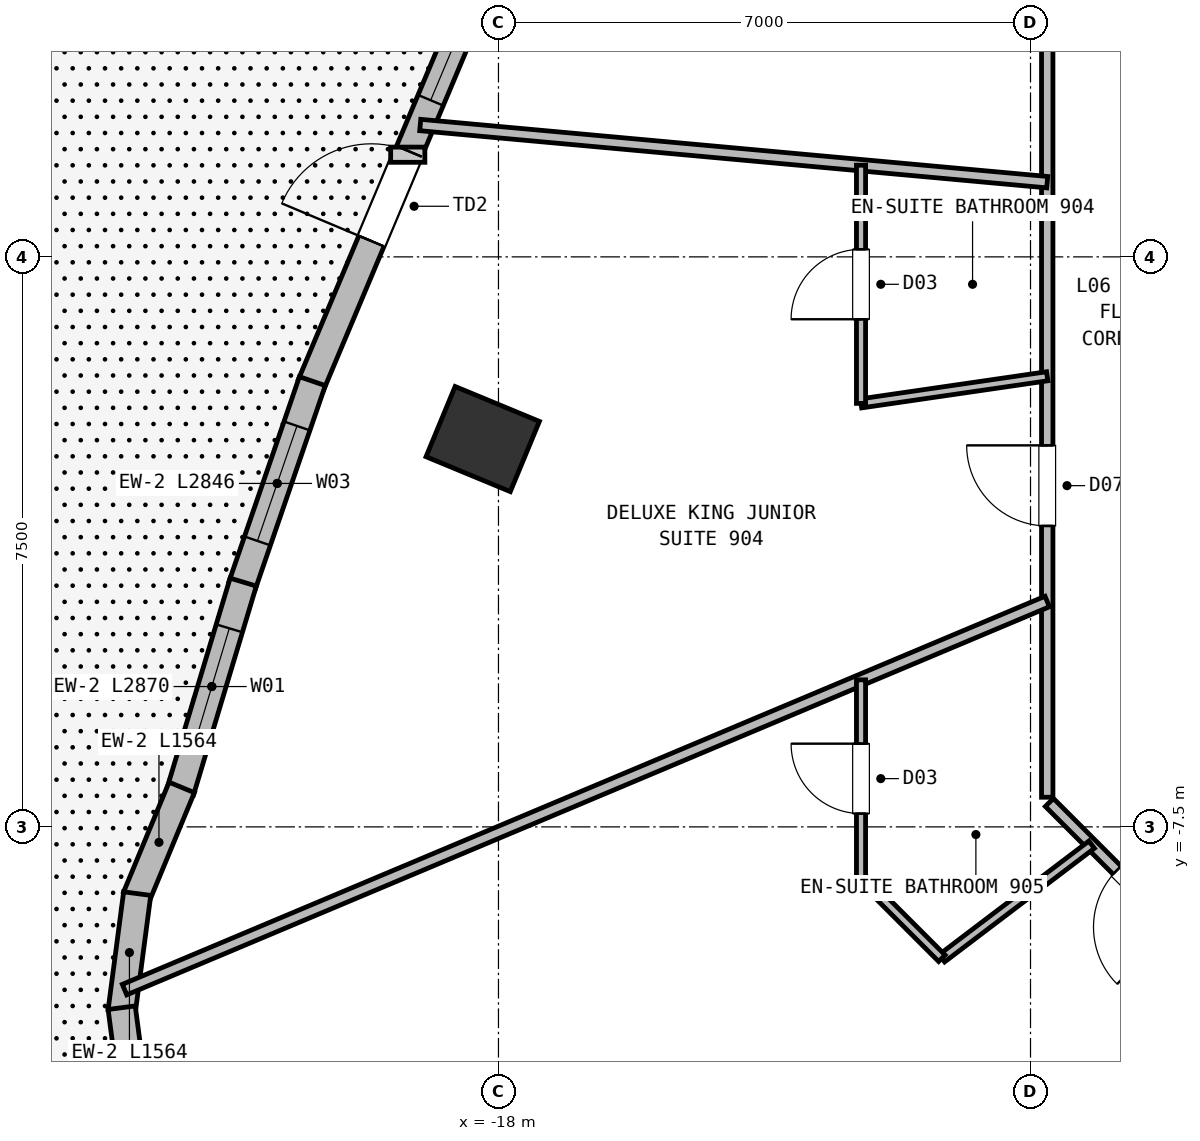
"""IFC4 building model, lengths in metres.
Left out: names, types, materials, properties, quantities, classifications, styles, units other than length and angle.
Written with IfcOpenShell. Run it as: python <this file> out.ifc"""

import sys

from ifc_helpers import new_model, si_unit, direction, frame, frame_2d, origin, origin_2d, place, context, subcontext, project, spatial, rectangle, extrude, element, fill, save


model = new_model("IFC4")
c1 = context("Model", 3, precision=1e-05, world=origin(), true_north=direction((0.0, 1.0)))
c2 = subcontext(c1, "Body", "Model", "MODEL_VIEW")
j1 = project(units=[si_unit("LENGTHUNIT", "METRE"), si_unit("PLANEANGLEUNIT", "RADIAN")], contexts=[c1])
p1 = place(None, origin())
s1 = spatial("IfcSite", under=j1, at=p1, CompositionType="ELEMENT")
p2 = place(p1, origin())
s2 = spatial("IfcBuilding", under=s1, at=p2, CompositionType="ELEMENT")
p3 = place(p2, frame((0.0, 0.0, 30.5)))
s3 = spatial("IfcBuildingStorey", under=s2, at=p3, CompositionType="ELEMENT", Elevation=30.5)
p4 = place(p3, frame((-18.207, -2.397, 0.0), z_axis=(0.0, 0.0, 1.0), x_axis=(0.382683432365, 0.923879532511, 0.0)))
e1 = element("IfcColumn", 1, at=p4, inside=s3, PredefinedType="COLUMN", context=c2, shape_type="SweptSolid", body=[
    extrude(rectangle(XDim=1.0, YDim=1.2, at=origin_2d()), origin(), (0.0, 0.0, 1.0), 3.75),
])
p5 = place(p3, frame((-20.466, -1.682, 0.0), z_axis=(0.0, 0.0, 1.0), x_axis=(0.387744465456, 0.921766906277, 0.0)))
e2 = element("IfcWall", 2, at=p5, inside=s3, PredefinedType="SOLIDWALL", context=c2, shape_type="SweptSolid", body=[
    extrude(rectangle(XDim=6.566, YDim=0.36, at=frame_2d((3.283, 0.0))), origin(), (0.0, 0.0, 1.0), 3.5),
])
p6 = place(p5, frame((2.05, 0.0, 0.0)))
e3 = element("IfcOpeningElement", 3, at=p6, cuts=e2, PredefinedType="OPENING", context=c2, shape_type="SweptSolid", body=[
    extrude(rectangle(XDim=1.28, YDim=2.2, at=frame_2d((0.64, 1.1))), frame((0.0, 0.19, 0.0), z_axis=(0.0, -1.0, 0.0), x_axis=(1.0, 0.0, 0.0)), (0.0, 0.0, 1.0), 0.38),
])
p7 = place(p5, frame((4.06, 0.0, 0.72)))
e4 = element("IfcOpeningElement", 4, at=p7, cuts=e2, PredefinedType="OPENING", context=c2, shape_type="SweptSolid", body=[
    extrude(rectangle(XDim=1.6, YDim=1.88, at=frame_2d((0.8, 0.94))), frame((0.0, 0.19, 0.0), z_axis=(0.0, -1.0, 0.0), x_axis=(1.0, 0.0, 0.0)), (0.0, 0.0, 1.0), 0.38),
])
p8 = place(p3, frame((-21.374, -4.327, 0.0), z_axis=(0.0, 0.0, 1.0), x_axis=(0.325091754677, 0.945682478975, 0.0)))
e5 = element("IfcWall", 5, at=p8, inside=s3, PredefinedType="SOLIDWALL", context=c2, shape_type="SweptSolid", body=[
    extrude(rectangle(XDim=2.846, YDim=0.36, at=frame_2d((1.423, 0.0))), origin(), (0.0, 0.0, 1.0), 3.5),
])
p9 = place(p8, frame((0.623, 0.0, 0.72)))
e6 = element("IfcOpeningElement", 6, at=p9, cuts=e5, PredefinedType="OPENING", context=c2, shape_type="SweptSolid", body=[
    extrude(rectangle(XDim=1.6, YDim=1.88, at=frame_2d((0.8, 0.94))), frame((0.0, 0.19, 0.0), z_axis=(0.0, -1.0, 0.0), x_axis=(1.0, 0.0, 0.0)), (0.0, 0.0, 1.0), 0.38),
])
p10 = place(p3, frame((-22.184, -7.028, 0.0), z_axis=(0.0, 0.0, 1.0), x_axis=(0.287784902043, 0.957695071594, 0.0)))
e7 = element("IfcWall", 7, at=p10, inside=s3, PredefinedType="SOLIDWALL", context=c2, shape_type="SweptSolid", body=[
    extrude(rectangle(XDim=2.87, YDim=0.36, at=frame_2d((1.435, 0.0))), origin(), (0.0, 0.0, 1.0), 3.5),
])
p11 = place(p10, frame((0.635, 0.0, 0.72)))
e8 = element("IfcOpeningElement", 8, at=p11, cuts=e7, PredefinedType="OPENING", context=c2, shape_type="SweptSolid", body=[
    extrude(rectangle(XDim=1.6, YDim=1.88, at=frame_2d((0.8, 0.94))), frame((0.0, 0.19, 0.0), z_axis=(0.0, -1.0, 0.0), x_axis=(1.0, 0.0, 0.0)), (0.0, 0.0, 1.0), 0.38),
])
for number, where, z_axis, x_axis in (
    (9, (-22.766, -8.426, 0.0), (0.0, 0.0, 1.0), (0.383, 0.924, 0.0)),
    (10, (-22.958, -9.929, 0.0), (0.0, 0.0, 1.0), (0.131, 0.991, 0.0)),
    (11, (-22.753, -11.43, 0.0), (0.0, 0.0, 1.0), (-0.131, 0.991, 0.0)),
):
    element("IfcWall", number, at=place(p3, frame(where, z_axis=z_axis, x_axis=x_axis)), inside=s3, PredefinedType="SOLIDWALL", context=c2, shape_type="SweptSolid", body=[
        extrude(rectangle(XDim=1.564, YDim=0.36, at=frame_2d((0.782, 0.0))), origin(), (0.0, 0.0, 1.0), 3.5),
    ])
p12 = place(p3, frame((-10.78, -7.11, 0.0), z_axis=(0.0, 0.0, 1.0), x_axis=(0.0, 1.0, 0.0)))
e12 = element("IfcWall", 12, at=p12, inside=s3, PredefinedType="PARTITIONING", context=c2, shape_type="SweptSolid", body=[
    extrude(rectangle(XDim=14.22, YDim=0.15, at=frame_2d((7.11, 0.0))), origin(), (0.0, 0.0, 1.0), 3.12),
])
p13 = place(p12, frame((10.606, 0.0, 0.0)))
e13 = element("IfcOpeningElement", 13, at=p13, cuts=e12, PredefinedType="OPENING", context=c2, shape_type="SweptSolid", body=[
    extrude(rectangle(XDim=1.0, YDim=2.15, at=frame_2d((0.5, 1.075))), frame((0.0, 0.085, 0.0), z_axis=(0.0, -1.0, 0.0), x_axis=(1.0, 0.0, 0.0)), (0.0, 0.0, 1.0), 0.17),
])
p14 = place(p12, frame((3.57, 0.0, 0.0)))
e14 = element("IfcOpeningElement", 14, at=p14, cuts=e12, PredefinedType="OPENING", context=c2, shape_type="SweptSolid", body=[
    extrude(rectangle(XDim=1.06, YDim=2.15, at=frame_2d((0.53, 1.075))), frame((0.0, 0.085, 0.0), z_axis=(0.0, -1.0, 0.0), x_axis=(1.0, 0.0, 0.0)), (0.0, 0.0, 1.0), 0.17),
])
p15 = place(p3, frame((-8.578, -9.352, 0.0), z_axis=(0.0, 0.0, 1.0), x_axis=(-0.707067066127, 0.707146494016, 0.0)))
e15 = element("IfcWall", 15, at=p15, inside=s3, PredefinedType="PARTITIONING", context=c2, shape_type="SweptSolid", body=[
    extrude(rectangle(XDim=3.074, YDim=0.15, at=frame_2d((1.537, 0.0))), origin(), (0.0, 0.0, 1.0), 3.5),
])
p16 = place(p15, frame((0.754, 0.0, 0.0)))
e16 = element("IfcOpeningElement", 16, at=p16, cuts=e15, PredefinedType="OPENING", context=c2, shape_type="SweptSolid", body=[
    extrude(rectangle(XDim=1.06, YDim=2.15, at=frame_2d((0.53, 1.075))), frame((0.0, 0.085, 0.0), z_axis=(0.0, -1.0, 0.0), x_axis=(1.0, 0.0, 0.0)), (0.0, 0.0, 1.0), 0.17),
])
p17 = place(p3, frame((-10.78, 0.983, 0.0), z_axis=(0.0, 0.0, 1.0), x_axis=(-0.995868528088, 0.090806799107, 0.0)))
e17 = element("IfcWall", 17, at=p17, inside=s3, PredefinedType="PARTITIONING", context=c2, shape_type="SweptSolid", body=[
    extrude(rectangle(XDim=8.283, YDim=0.15, at=frame_2d((4.142, 0.0))), origin(), (0.0, 0.0, 1.0), 3.5),
])
p18 = place(p3, frame((-10.78, -1.571, 0.0), z_axis=(0.0, 0.0, 1.0), x_axis=(-0.989553213028, -0.144168091425, 0.0)))
e18 = element("IfcWall", 18, at=p18, inside=s3, PredefinedType="PARTITIONING", context=c2, shape_type="SweptSolid", body=[
    extrude(rectangle(XDim=2.476, YDim=0.12, at=frame_2d((1.238, 0.0))), origin(), (0.0, 0.0, 1.0), 3.5),
])
p19 = place(p3, frame((-13.23, -1.928, 0.0), z_axis=(0.0, 0.0, 1.0), x_axis=(0.0, 1.0, 0.0)))
e19 = element("IfcWall", 19, at=p19, inside=s3, PredefinedType="PARTITIONING", context=c2, shape_type="SweptSolid", body=[
    extrude(rectangle(XDim=3.134, YDim=0.12, at=frame_2d((1.567, 0.0))), origin(), (0.0, 0.0, 1.0), 3.12),
])
p20 = place(p19, frame((1.107, 0.0, 0.0)))
e20 = element("IfcOpeningElement", 20, at=p20, cuts=e19, PredefinedType="OPENING", context=c2, shape_type="SweptSolid", body=[
    extrude(rectangle(XDim=0.92, YDim=2.1, at=frame_2d((0.46, 1.05))), frame((0.0, 0.07, 0.0), z_axis=(0.0, -1.0, 0.0), x_axis=(1.0, 0.0, 0.0)), (0.0, 0.0, 1.0), 0.14),
])
p21 = place(p3, frame((-10.78, -4.535, 0.0), z_axis=(0.0, 0.0, 1.0), x_axis=(-0.921767922979, -0.387742048489, 0.0)))
e21 = element("IfcWall", 21, at=p21, inside=s3, PredefinedType="PARTITIONING", context=c2, shape_type="SweptSolid", body=[
    extrude(rectangle(XDim=13.17, YDim=0.15, at=frame_2d((6.585, 0.0))), origin(), (0.0, 0.0, 1.0), 3.5),
])
p22 = place(p3, frame((-12.166, -9.229, 0.0), z_axis=(0.0, 0.0, 1.0), x_axis=(0.796694549239, 0.604382159906, 0.0)))
e22 = element("IfcWall", 22, at=p22, inside=s3, PredefinedType="PARTITIONING", context=c2, shape_type="SweptSolid", body=[
    extrude(rectangle(XDim=2.473, YDim=0.12, at=frame_2d((1.236, 0.0))), origin(), (0.0, 0.0, 1.0), 3.5),
])
p23 = place(p3, frame((-12.166, -9.229, 0.0), z_axis=(0.0, 0.0, 1.0), x_axis=(-0.707106781187, 0.707106781187, 0.0)))
e23 = element("IfcWall", 23, at=p23, inside=s3, PredefinedType="PARTITIONING", context=c2, shape_type="SweptSolid", body=[
    extrude(rectangle(XDim=1.505, YDim=0.12, at=frame_2d((0.752, 0.0))), origin(), (0.0, 0.0, 1.0), 3.5),
])
p24 = place(p3, frame((-13.23, -8.165, 0.0), z_axis=(0.0, 0.0, 1.0), x_axis=(0.0, 1.0, 0.0)))
e24 = element("IfcWall", 24, at=p24, inside=s3, PredefinedType="PARTITIONING", context=c2, shape_type="SweptSolid", body=[
    extrude(rectangle(XDim=2.6, YDim=0.12, at=frame_2d((1.3, 0.0))), origin(), (0.0, 0.0, 1.0), 3.12),
])
p25 = place(p24, frame((0.84, 0.0, 0.0)))
e25 = element("IfcOpeningElement", 25, at=p25, cuts=e24, PredefinedType="OPENING", context=c2, shape_type="SweptSolid", body=[
    extrude(rectangle(XDim=0.92, YDim=2.1, at=frame_2d((0.46, 1.05))), frame((0.0, 0.07, 0.0), z_axis=(0.0, -1.0, 0.0), x_axis=(1.0, 0.0, 0.0)), (0.0, 0.0, 1.0), 0.14),
])
p26 = place(p3, frame((-6.802, -9.38, 0.0), z_axis=(0.0, 0.0, 1.0), x_axis=(-0.58706335667, -0.809540990472, 0.0)))
e26 = element("IfcWall", 26, at=p26, inside=s3, PredefinedType="PARTITIONING", context=c2, shape_type="SweptSolid", body=[
    extrude(rectangle(XDim=9.146, YDim=0.15, at=frame_2d((4.573, 0.0))), origin(), (0.0, 0.0, 1.0), 3.5),
])
p27 = place(p6, origin())
e27 = element("IfcDoor", 27, at=p27, inside=s3, OperationType="SINGLE_SWING_LEFT", PredefinedType="DOOR", context=c2, shape_type="SweptSolid", body=[
    extrude(rectangle(XDim=1.28, YDim=2.2, at=frame_2d((0.64, 1.1))), frame((0.0, 0.025, 0.0), z_axis=(0.0, -1.0, 0.0), x_axis=(1.0, 0.0, 0.0)), (0.0, 0.0, 1.0), 0.05),
])
fill(e3, e27)
p28 = place(p7, origin())
e28 = element("IfcWindow", 28, at=p28, inside=s3, PartitioningType="SINGLE_PANEL", PredefinedType="WINDOW", context=c2, shape_type="SweptSolid", body=[
    extrude(rectangle(XDim=1.6, YDim=1.88, at=frame_2d((0.8, 0.94))), frame((0.0, 0.03, 0.0), z_axis=(0.0, -1.0, 0.0), x_axis=(1.0, 0.0, 0.0)), (0.0, 0.0, 1.0), 0.06),
])
fill(e4, e28)
p29 = place(p9, origin())
e29 = element("IfcWindow", 29, at=p29, inside=s3, PartitioningType="SINGLE_PANEL", PredefinedType="WINDOW", context=c2, shape_type="SweptSolid", body=[
    extrude(rectangle(XDim=1.6, YDim=1.88, at=frame_2d((0.8, 0.94))), frame((0.0, 0.03, 0.0), z_axis=(0.0, -1.0, 0.0), x_axis=(1.0, 0.0, 0.0)), (0.0, 0.0, 1.0), 0.06),
])
fill(e6, e29)
p30 = place(p11, origin())
e30 = element("IfcWindow", 30, at=p30, inside=s3, PartitioningType="SINGLE_PANEL", PredefinedType="WINDOW", context=c2, shape_type="SweptSolid", body=[
    extrude(rectangle(XDim=1.6, YDim=1.88, at=frame_2d((0.8, 0.94))), frame((0.0, 0.03, 0.0), z_axis=(0.0, -1.0, 0.0), x_axis=(1.0, 0.0, 0.0)), (0.0, 0.0, 1.0), 0.06),
])
fill(e8, e30)
p31 = place(p20, origin())
e31 = element("IfcDoor", 31, at=p31, inside=s3, OperationType="SINGLE_SWING_LEFT", PredefinedType="DOOR", context=c2, shape_type="SweptSolid", body=[
    extrude(rectangle(XDim=0.92, YDim=2.1, at=frame_2d((0.46, 1.05))), frame((0.0, 0.025, 0.0), z_axis=(0.0, -1.0, 0.0), x_axis=(1.0, 0.0, 0.0)), (0.0, 0.0, 1.0), 0.05),
])
fill(e20, e31)
p32 = place(p25, origin())
e32 = element("IfcDoor", 32, at=p32, inside=s3, OperationType="SINGLE_SWING_RIGHT", PredefinedType="DOOR", context=c2, shape_type="SweptSolid", body=[
    extrude(rectangle(XDim=0.92, YDim=2.1, at=frame_2d((0.46, 1.05))), frame((0.0, 0.025, 0.0), z_axis=(0.0, -1.0, 0.0), x_axis=(1.0, 0.0, 0.0)), (0.0, 0.0, 1.0), 0.05),
])
fill(e25, e32)
p33 = place(p14, origin())
e33 = element("IfcDoor", 33, at=p33, inside=s3, OperationType="SINGLE_SWING_RIGHT", PredefinedType="DOOR", context=c2, shape_type="SweptSolid", body=[
    extrude(rectangle(XDim=1.06, YDim=2.15, at=frame_2d((0.53, 1.075))), frame((0.0, 0.025, 0.0), z_axis=(0.0, -1.0, 0.0), x_axis=(1.0, 0.0, 0.0)), (0.0, 0.0, 1.0), 0.05),
])
fill(e14, e33)
p34 = place(p16, origin())
e34 = element("IfcDoor", 34, at=p34, inside=s3, OperationType="SINGLE_SWING_LEFT", PredefinedType="DOOR", context=c2, shape_type="SweptSolid", body=[
    extrude(rectangle(XDim=1.06, YDim=2.15, at=frame_2d((0.53, 1.075))), frame((0.0, 0.025, 0.0), z_axis=(0.0, -1.0, 0.0), x_axis=(1.0, 0.0, 0.0)), (0.0, 0.0, 1.0), 0.05),
])
fill(e16, e34)
save(model, sys.argv[1])
